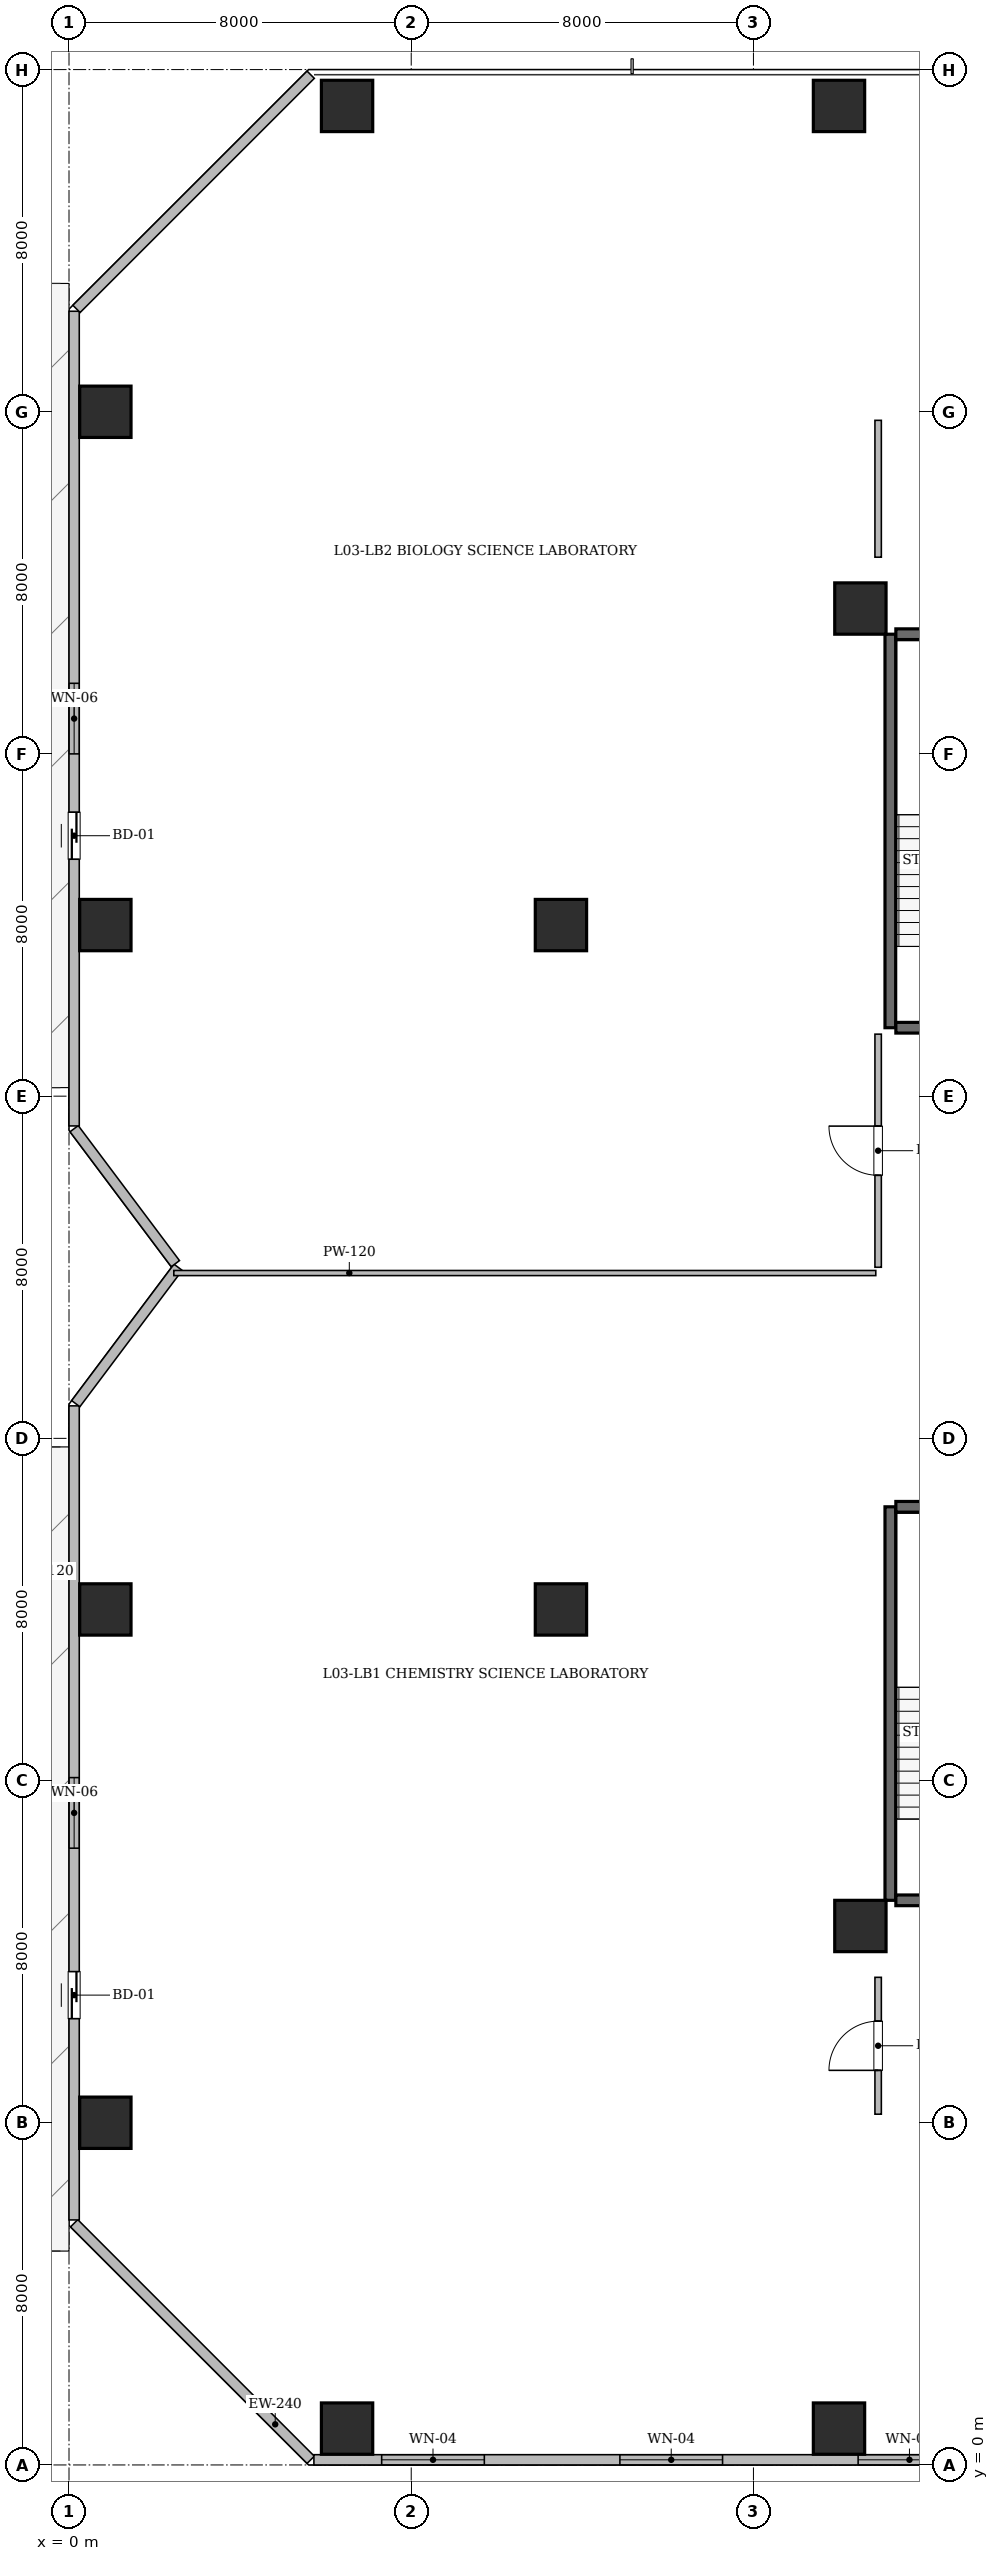
"""IFC4 building model, lengths in metres.
Left out: names, types, materials, properties, quantities, classifications, styles, units other than length and angle.
Written with IfcOpenShell. Run it as: python <this file> out.ifc"""

import sys

from ifc_helpers import new_model, si_unit, direction, frame, frame_2d, origin, origin_2d, place, context, subcontext, project, spatial, rectangle, hollow_rectangle, extrude, element, fill, save


model = new_model("IFC4")
c1 = context("Model", 3, precision=1e-05, world=origin(), true_north=direction((0.0, 1.0)))
c2 = subcontext(c1, "Body", "Model", "MODEL_VIEW")
j1 = project(units=[si_unit("LENGTHUNIT", "METRE"), si_unit("PLANEANGLEUNIT", "RADIAN")], contexts=[c1])
p1 = place(None, origin())
s1 = spatial("IfcSite", under=j1, at=p1, CompositionType="ELEMENT")
p2 = place(p1, origin())
s2 = spatial("IfcBuilding", under=s1, at=p2, CompositionType="ELEMENT")
p3 = place(p2, frame((0.0, 0.0, 16.2)))
s3 = spatial("IfcBuildingStorey", under=s2, at=p3, CompositionType="ELEMENT", Elevation=16.2)
for number, where, z_axis, x_axis in (
    (1, (6.5, 0.85, 0.0), (0.0, 0.0, 1.0), (1.0, 0.0, 0.0)),
    (2, (18.0, 0.85, 0.0), (0.0, 0.0, 1.0), (1.0, 0.0, 0.0)),
    (3, (6.5, 55.15, 0.0), (0.0, 0.0, 1.0), (1.0, 0.0, 0.0)),
    (4, (18.0, 55.15, 0.0), (0.0, 0.0, 1.0), (1.0, 0.0, 0.0)),
    (5, (0.85, 8.0, 0.0), (0.0, 0.0, 1.0), (1.0, 0.0, 0.0)),
    (6, (0.85, 20.0, 0.0), (0.0, 0.0, 1.0), (1.0, 0.0, 0.0)),
    (7, (0.85, 36.0, 0.0), (0.0, 0.0, 1.0), (1.0, 0.0, 0.0)),
    (8, (0.85, 48.0, 0.0), (0.0, 0.0, 1.0), (1.0, 0.0, 0.0)),
    (9, (18.5, 12.6, 0.0), (0.0, 0.0, 1.0), (1.0, 0.0, 0.0)),
    (10, (18.5, 43.4, 0.0), (0.0, 0.0, 1.0), (1.0, 0.0, 0.0)),
    (11, (11.5, 20.0, 0.0), (0.0, 0.0, 1.0), (1.0, 0.0, 0.0)),
    (12, (11.5, 36.0, 0.0), (0.0, 0.0, 1.0), (1.0, 0.0, 0.0)),
):
    element("IfcColumn", number, at=place(p3, frame(where, z_axis=z_axis, x_axis=x_axis)), inside=s3, PredefinedType="COLUMN", context=c2, shape_type="SweptSolid", body=[
        extrude(hollow_rectangle(XDim=1.2, YDim=1.2, WallThickness=0.06, at=origin_2d()), origin(), (0.0, 0.0, 1.0), 4.2),
    ])
p4 = place(p3, frame((5.65, 0.12, 0.0), z_axis=(0.0, 0.0, 1.0), x_axis=(-0.707106781187, 0.707106781187, 0.0)))
e13 = element("IfcWall", 13, at=p4, inside=s3, PredefinedType="STANDARD", context=c2, shape_type="SweptSolid", body=[
    extrude(rectangle(XDim=7.82, YDim=0.24, at=frame_2d((3.91, 0.0))), origin(), (0.0, 0.0, 1.0), 3.92),
])
p5 = place(p3, frame((0.12, 5.728, 0.0), z_axis=(0.0, 0.0, 1.0), x_axis=(0.0, 1.0, 0.0)))
e14 = element("IfcWall", 14, at=p5, inside=s3, PredefinedType="STANDARD", context=c2, shape_type="SweptSolid", body=[
    extrude(rectangle(XDim=19.032, YDim=0.24, at=frame_2d((9.516, 0.0))), origin(), (0.0, 0.0, 1.0), 3.92),
])
p6 = place(p5, frame((4.706, 0.0, 0.0)))
e15 = element("IfcOpeningElement", 15, at=p6, cuts=e14, PredefinedType="OPENING", context=c2, shape_type="SweptSolid", body=[
    extrude(rectangle(XDim=1.1, YDim=2.2, at=frame_2d((0.55, 1.1))), frame((0.0, 0.13, 0.0), z_axis=(0.0, -1.0, 0.0), x_axis=(1.0, 0.0, 0.0)), (0.0, 0.0, 1.0), 0.26),
])
p7 = place(p5, frame((8.691, 0.0, 0.85)))
e16 = element("IfcOpeningElement", 16, at=p7, cuts=e14, PredefinedType="OPENING", context=c2, shape_type="SweptSolid", body=[
    extrude(rectangle(XDim=1.65, YDim=1.55, at=frame_2d((0.825, 0.775))), frame((0.0, 0.13, 0.0), z_axis=(0.0, -1.0, 0.0), x_axis=(1.0, 0.0, 0.0)), (0.0, 0.0, 1.0), 0.26),
])
p8 = place(p3, frame((0.158, 24.811, 0.0), z_axis=(0.0, 0.0, 1.0), x_axis=(0.600058791648, 0.799955902889, 0.0)))
e17 = element("IfcWall", 17, at=p8, inside=s3, PredefinedType="STANDARD", context=c2, shape_type="SweptSolid", body=[
    extrude(rectangle(XDim=3.986, YDim=0.24, at=frame_2d((1.993, 0.0))), origin(), (0.0, 0.0, 1.0), 3.92),
])
p9 = place(p3, frame((2.487, 28.084, 0.0), z_axis=(0.0, 0.0, 1.0), x_axis=(-0.599990098106, 0.800007426325, 0.0)))
e18 = element("IfcWall", 18, at=p9, inside=s3, PredefinedType="STANDARD", context=c2, shape_type="SweptSolid", body=[
    extrude(rectangle(XDim=3.945, YDim=0.24, at=frame_2d((1.973, 0.0))), origin(), (0.0, 0.0, 1.0), 3.92),
])
p10 = place(p3, frame((0.12, 31.304, 0.0), z_axis=(0.0, 0.0, 1.0), x_axis=(0.0, 1.0, 0.0)))
e19 = element("IfcWall", 19, at=p10, inside=s3, PredefinedType="STANDARD", context=c2, shape_type="SweptSolid", body=[
    extrude(rectangle(XDim=19.046, YDim=0.24, at=frame_2d((9.523, 0.0))), origin(), (0.0, 0.0, 1.0), 3.92),
])
p11 = place(p10, frame((6.235, 0.0, 0.0)))
e20 = element("IfcOpeningElement", 20, at=p11, cuts=e19, PredefinedType="OPENING", context=c2, shape_type="SweptSolid", body=[
    extrude(rectangle(XDim=1.1, YDim=2.2, at=frame_2d((0.55, 1.1))), frame((0.0, 0.13, 0.0), z_axis=(0.0, -1.0, 0.0), x_axis=(1.0, 0.0, 0.0)), (0.0, 0.0, 1.0), 0.26),
])
p12 = place(p10, frame((8.698, 0.0, 0.85)))
e21 = element("IfcOpeningElement", 21, at=p12, cuts=e19, PredefinedType="OPENING", context=c2, shape_type="SweptSolid", body=[
    extrude(rectangle(XDim=1.65, YDim=1.55, at=frame_2d((0.825, 0.775))), frame((0.0, 0.13, 0.0), z_axis=(0.0, -1.0, 0.0), x_axis=(1.0, 0.0, 0.0)), (0.0, 0.0, 1.0), 0.26),
])
p13 = place(p3, frame((0.175, 50.405, 0.0), z_axis=(0.0, 0.0, 1.0), x_axis=(0.707106781187, 0.707106781187, 0.0)))
e22 = element("IfcWall", 22, at=p13, inside=s3, PredefinedType="STANDARD", context=c2, shape_type="SweptSolid", body=[
    extrude(rectangle(XDim=7.743, YDim=0.24, at=frame_2d((3.871, 0.0))), origin(), (0.0, 0.0, 1.0), 3.92),
])
p14 = place(p3, frame((50.275, 0.12, 0.0), z_axis=(0.0, 0.0, 1.0), x_axis=(-1.0, 0.0, 0.0)))
e23 = element("IfcWall", 23, at=p14, inside=s3, PredefinedType="STANDARD", context=c2, shape_type="SweptSolid", body=[
    extrude(rectangle(XDim=44.55, YDim=0.24, at=frame_2d((22.275, 0.0))), origin(), (0.0, 0.0, 1.0), 3.92),
])
p15 = place(p14, frame((1.584, 0.0, 0.9)))
e24 = element("IfcOpeningElement", 24, at=p15, cuts=e23, PredefinedType="OPENING", context=c2, shape_type="SweptSolid", body=[
    extrude(rectangle(XDim=2.4, YDim=1.7, at=frame_2d((1.2, 0.85))), frame((0.0, 0.13, 0.0), z_axis=(0.0, -1.0, 0.0), x_axis=(1.0, 0.0, 0.0)), (0.0, 0.0, 1.0), 0.26),
])
p16 = place(p14, frame((7.153, 0.0, 0.9)))
e25 = element("IfcOpeningElement", 25, at=p16, cuts=e23, PredefinedType="OPENING", context=c2, shape_type="SweptSolid", body=[
    extrude(rectangle(XDim=2.4, YDim=1.7, at=frame_2d((1.2, 0.85))), frame((0.0, 0.13, 0.0), z_axis=(0.0, -1.0, 0.0), x_axis=(1.0, 0.0, 0.0)), (0.0, 0.0, 1.0), 0.26),
])
p17 = place(p14, frame((12.722, 0.0, 0.9)))
e26 = element("IfcOpeningElement", 26, at=p17, cuts=e23, PredefinedType="OPENING", context=c2, shape_type="SweptSolid", body=[
    extrude(rectangle(XDim=2.4, YDim=1.7, at=frame_2d((1.2, 0.85))), frame((0.0, 0.13, 0.0), z_axis=(0.0, -1.0, 0.0), x_axis=(1.0, 0.0, 0.0)), (0.0, 0.0, 1.0), 0.26),
])
p18 = place(p14, frame((18.291, 0.0, 0.9)))
e27 = element("IfcOpeningElement", 27, at=p18, cuts=e23, PredefinedType="OPENING", context=c2, shape_type="SweptSolid", body=[
    extrude(rectangle(XDim=2.4, YDim=1.7, at=frame_2d((1.2, 0.85))), frame((0.0, 0.13, 0.0), z_axis=(0.0, -1.0, 0.0), x_axis=(1.0, 0.0, 0.0)), (0.0, 0.0, 1.0), 0.26),
])
p19 = place(p14, frame((23.859, 0.0, 0.9)))
e28 = element("IfcOpeningElement", 28, at=p19, cuts=e23, PredefinedType="OPENING", context=c2, shape_type="SweptSolid", body=[
    extrude(rectangle(XDim=2.4, YDim=1.7, at=frame_2d((1.2, 0.85))), frame((0.0, 0.13, 0.0), z_axis=(0.0, -1.0, 0.0), x_axis=(1.0, 0.0, 0.0)), (0.0, 0.0, 1.0), 0.26),
])
p20 = place(p14, frame((29.428, 0.0, 0.9)))
e29 = element("IfcOpeningElement", 29, at=p20, cuts=e23, PredefinedType="OPENING", context=c2, shape_type="SweptSolid", body=[
    extrude(rectangle(XDim=2.4, YDim=1.7, at=frame_2d((1.2, 0.85))), frame((0.0, 0.13, 0.0), z_axis=(0.0, -1.0, 0.0), x_axis=(1.0, 0.0, 0.0)), (0.0, 0.0, 1.0), 0.26),
])
p21 = place(p14, frame((34.997, 0.0, 0.9)))
e30 = element("IfcOpeningElement", 30, at=p21, cuts=e23, PredefinedType="OPENING", context=c2, shape_type="SweptSolid", body=[
    extrude(rectangle(XDim=2.4, YDim=1.7, at=frame_2d((1.2, 0.85))), frame((0.0, 0.13, 0.0), z_axis=(0.0, -1.0, 0.0), x_axis=(1.0, 0.0, 0.0)), (0.0, 0.0, 1.0), 0.26),
])
p22 = place(p14, frame((40.566, 0.0, 0.9)))
e31 = element("IfcOpeningElement", 31, at=p22, cuts=e23, PredefinedType="OPENING", context=c2, shape_type="SweptSolid", body=[
    extrude(rectangle(XDim=2.4, YDim=1.7, at=frame_2d((1.2, 0.85))), frame((0.0, 0.13, 0.0), z_axis=(0.0, -1.0, 0.0), x_axis=(1.0, 0.0, 0.0)), (0.0, 0.0, 1.0), 0.26),
])
p23 = place(p3, frame((19.2, 13.2, 0.0), z_axis=(0.0, 0.0, 1.0), x_axis=(0.0, 1.0, 0.0)))
e32 = element("IfcWall", 32, at=p23, inside=s3, PredefinedType="SHEAR", context=c2, shape_type="SweptSolid", body=[
    extrude(rectangle(XDim=9.2, YDim=0.25, at=frame_2d((4.6, 0.0))), origin(), (0.0, 0.0, 1.0), 3.92),
])
for number, where, z_axis, x_axis in (
    (33, (19.329, 13.2, 0.0), (0.0, 0.0, 1.0), (1.0, 0.0, 0.0)),
    (34, (19.329, 22.4, 0.0), (0.0, 0.0, 1.0), (1.0, 0.0, 0.0)),
):
    element("IfcWall", number, at=place(p3, frame(where, z_axis=z_axis, x_axis=x_axis)), inside=s3, PredefinedType="SHEAR", context=c2, shape_type="SweptSolid", body=[
        extrude(rectangle(XDim=3.692, YDim=0.25, at=frame_2d((1.846, 0.0))), origin(), (0.0, 0.0, 1.0), 3.92),
    ])
p24 = place(p3, frame((19.2, 33.6, 0.0), z_axis=(0.0, 0.0, 1.0), x_axis=(0.0, 1.0, 0.0)))
e35 = element("IfcWall", 35, at=p24, inside=s3, PredefinedType="SHEAR", context=c2, shape_type="SweptSolid", body=[
    extrude(rectangle(XDim=9.2, YDim=0.25, at=frame_2d((4.6, 0.0))), origin(), (0.0, 0.0, 1.0), 3.92),
])
for number, where, z_axis, x_axis in (
    (36, (19.329, 33.6, 0.0), (0.0, 0.0, 1.0), (1.0, 0.0, 0.0)),
    (37, (19.329, 42.8, 0.0), (0.0, 0.0, 1.0), (1.0, 0.0, 0.0)),
):
    element("IfcWall", number, at=place(p3, frame(where, z_axis=z_axis, x_axis=x_axis)), inside=s3, PredefinedType="SHEAR", context=c2, shape_type="SweptSolid", body=[
        extrude(rectangle(XDim=3.692, YDim=0.25, at=frame_2d((1.846, 0.0))), origin(), (0.0, 0.0, 1.0), 3.92),
    ])
p25 = place(p3, frame((18.915, 8.2, 0.0), z_axis=(0.0, 0.0, 1.0), x_axis=(0.0, 1.0, 0.0)))
e38 = element("IfcWall", 38, at=p25, inside=s3, PredefinedType="STANDARD", context=c2, shape_type="SweptSolid", body=[
    extrude(rectangle(XDim=3.2, YDim=0.15, at=frame_2d((1.6, 0.0))), origin(), (0.0, 0.0, 1.0), 3.92),
])
p26 = place(p25, frame((1.025, 0.0, 0.0)))
e39 = element("IfcOpeningElement", 39, at=p26, cuts=e38, PredefinedType="OPENING", context=c2, shape_type="SweptSolid", body=[
    extrude(rectangle(XDim=1.15, YDim=2.2, at=frame_2d((0.575, 1.1))), frame((0.0, 0.085, 0.0), z_axis=(0.0, -1.0, 0.0), x_axis=(1.0, 0.0, 0.0)), (0.0, 0.0, 1.0), 0.17),
])
p27 = place(p3, frame((18.915, 28.0, 0.0), z_axis=(0.0, 0.0, 1.0), x_axis=(0.0, 1.0, 0.0)))
e40 = element("IfcWall", 40, at=p27, inside=s3, PredefinedType="STANDARD", context=c2, shape_type="SweptSolid", body=[
    extrude(rectangle(XDim=5.45, YDim=0.15, at=frame_2d((2.725, 0.0))), origin(), (0.0, 0.0, 1.0), 3.92),
])
p28 = place(p27, frame((2.15, 0.0, 0.0)))
e41 = element("IfcOpeningElement", 41, at=p28, cuts=e40, PredefinedType="OPENING", context=c2, shape_type="SweptSolid", body=[
    extrude(rectangle(XDim=1.15, YDim=2.2, at=frame_2d((0.575, 1.1))), frame((0.0, 0.085, 0.0), z_axis=(0.0, -1.0, 0.0), x_axis=(1.0, 0.0, 0.0)), (0.0, 0.0, 1.0), 0.17),
])
p29 = place(p3, frame((18.915, 44.6, 0.0), z_axis=(0.0, 0.0, 1.0), x_axis=(0.0, 1.0, 0.0)))
e42 = element("IfcWall", 42, at=p29, inside=s3, PredefinedType="STANDARD", context=c2, shape_type="SweptSolid", body=[
    extrude(rectangle(XDim=3.2, YDim=0.15, at=frame_2d((1.6, 0.0))), origin(), (0.0, 0.0, 1.0), 3.92),
])
p30 = place(p3, frame((2.45, 27.865, 0.0), z_axis=(0.0, 0.0, 1.0), x_axis=(1.0, 0.0, 0.0)))
e43 = element("IfcWall", 43, at=p30, inside=s3, PredefinedType="PARTITIONING", context=c2, shape_type="SweptSolid", body=[
    extrude(rectangle(XDim=16.41, YDim=0.12, at=frame_2d((8.205, 0.0))), origin(), (0.0, 0.0, 1.0), 3.055),
])
p31 = place(p6, origin())
e44 = element("IfcDoor", 44, at=p31, inside=s3, OperationType="SLIDING_TO_LEFT", PredefinedType="DOOR", context=c2, shape_type="SweptSolid", body=[
    extrude(rectangle(XDim=1.1, YDim=2.2, at=frame_2d((0.55, 1.1))), frame((0.0, 0.025, 0.0), z_axis=(0.0, -1.0, 0.0), x_axis=(1.0, 0.0, 0.0)), (0.0, 0.0, 1.0), 0.05),
])
fill(e15, e44)
p32 = place(p11, origin())
e45 = element("IfcDoor", 45, at=p32, inside=s3, OperationType="SLIDING_TO_LEFT", PredefinedType="DOOR", context=c2, shape_type="SweptSolid", body=[
    extrude(rectangle(XDim=1.1, YDim=2.2, at=frame_2d((0.55, 1.1))), frame((0.0, 0.025, 0.0), z_axis=(0.0, -1.0, 0.0), x_axis=(1.0, 0.0, 0.0)), (0.0, 0.0, 1.0), 0.05),
])
fill(e20, e45)
p33 = place(p7, origin())
e46 = element("IfcWindow", 46, at=p33, inside=s3, PartitioningType="SINGLE_PANEL", PredefinedType="WINDOW", context=c2, shape_type="SweptSolid", body=[
    extrude(rectangle(XDim=1.65, YDim=1.55, at=frame_2d((0.825, 0.775))), frame((0.0, 0.03, 0.0), z_axis=(0.0, -1.0, 0.0), x_axis=(1.0, 0.0, 0.0)), (0.0, 0.0, 1.0), 0.06),
])
fill(e16, e46)
p34 = place(p12, origin())
e47 = element("IfcWindow", 47, at=p34, inside=s3, PartitioningType="SINGLE_PANEL", PredefinedType="WINDOW", context=c2, shape_type="SweptSolid", body=[
    extrude(rectangle(XDim=1.65, YDim=1.55, at=frame_2d((0.825, 0.775))), frame((0.0, 0.03, 0.0), z_axis=(0.0, -1.0, 0.0), x_axis=(1.0, 0.0, 0.0)), (0.0, 0.0, 1.0), 0.06),
])
fill(e21, e47)
p35 = place(p20, origin())
e48 = element("IfcWindow", 48, at=p35, inside=s3, PartitioningType="SINGLE_PANEL", PredefinedType="WINDOW", context=c2, shape_type="SweptSolid", body=[
    extrude(rectangle(XDim=2.4, YDim=1.7, at=frame_2d((1.2, 0.85))), frame((0.0, 0.03, 0.0), z_axis=(0.0, -1.0, 0.0), x_axis=(1.0, 0.0, 0.0)), (0.0, 0.0, 1.0), 0.06),
])
fill(e29, e48)
p36 = place(p21, origin())
e49 = element("IfcWindow", 49, at=p36, inside=s3, PartitioningType="SINGLE_PANEL", PredefinedType="WINDOW", context=c2, shape_type="SweptSolid", body=[
    extrude(rectangle(XDim=2.4, YDim=1.7, at=frame_2d((1.2, 0.85))), frame((0.0, 0.03, 0.0), z_axis=(0.0, -1.0, 0.0), x_axis=(1.0, 0.0, 0.0)), (0.0, 0.0, 1.0), 0.06),
])
fill(e30, e49)
p37 = place(p22, origin())
e50 = element("IfcWindow", 50, at=p37, inside=s3, PartitioningType="SINGLE_PANEL", PredefinedType="WINDOW", context=c2, shape_type="SweptSolid", body=[
    extrude(rectangle(XDim=2.4, YDim=1.7, at=frame_2d((1.2, 0.85))), frame((0.0, 0.03, 0.0), z_axis=(0.0, -1.0, 0.0), x_axis=(1.0, 0.0, 0.0)), (0.0, 0.0, 1.0), 0.06),
])
fill(e31, e50)
p38 = place(p26, origin())
e51 = element("IfcDoor", 51, at=p38, inside=s3, OperationType="SINGLE_SWING_LEFT", PredefinedType="DOOR", context=c2, shape_type="SweptSolid", body=[
    extrude(rectangle(XDim=1.15, YDim=2.2, at=frame_2d((0.575, 1.1))), frame((0.0, 0.025, 0.0), z_axis=(0.0, -1.0, 0.0), x_axis=(1.0, 0.0, 0.0)), (0.0, 0.0, 1.0), 0.05),
])
fill(e39, e51)
p39 = place(p28, origin())
e52 = element("IfcDoor", 52, at=p39, inside=s3, OperationType="SINGLE_SWING_RIGHT", PredefinedType="DOOR", context=c2, shape_type="SweptSolid", body=[
    extrude(rectangle(XDim=1.15, YDim=2.2, at=frame_2d((0.575, 1.1))), frame((0.0, 0.025, 0.0), z_axis=(0.0, -1.0, 0.0), x_axis=(1.0, 0.0, 0.0)), (0.0, 0.0, 1.0), 0.05),
])
fill(e41, e52)
save(model, sys.argv[1])
